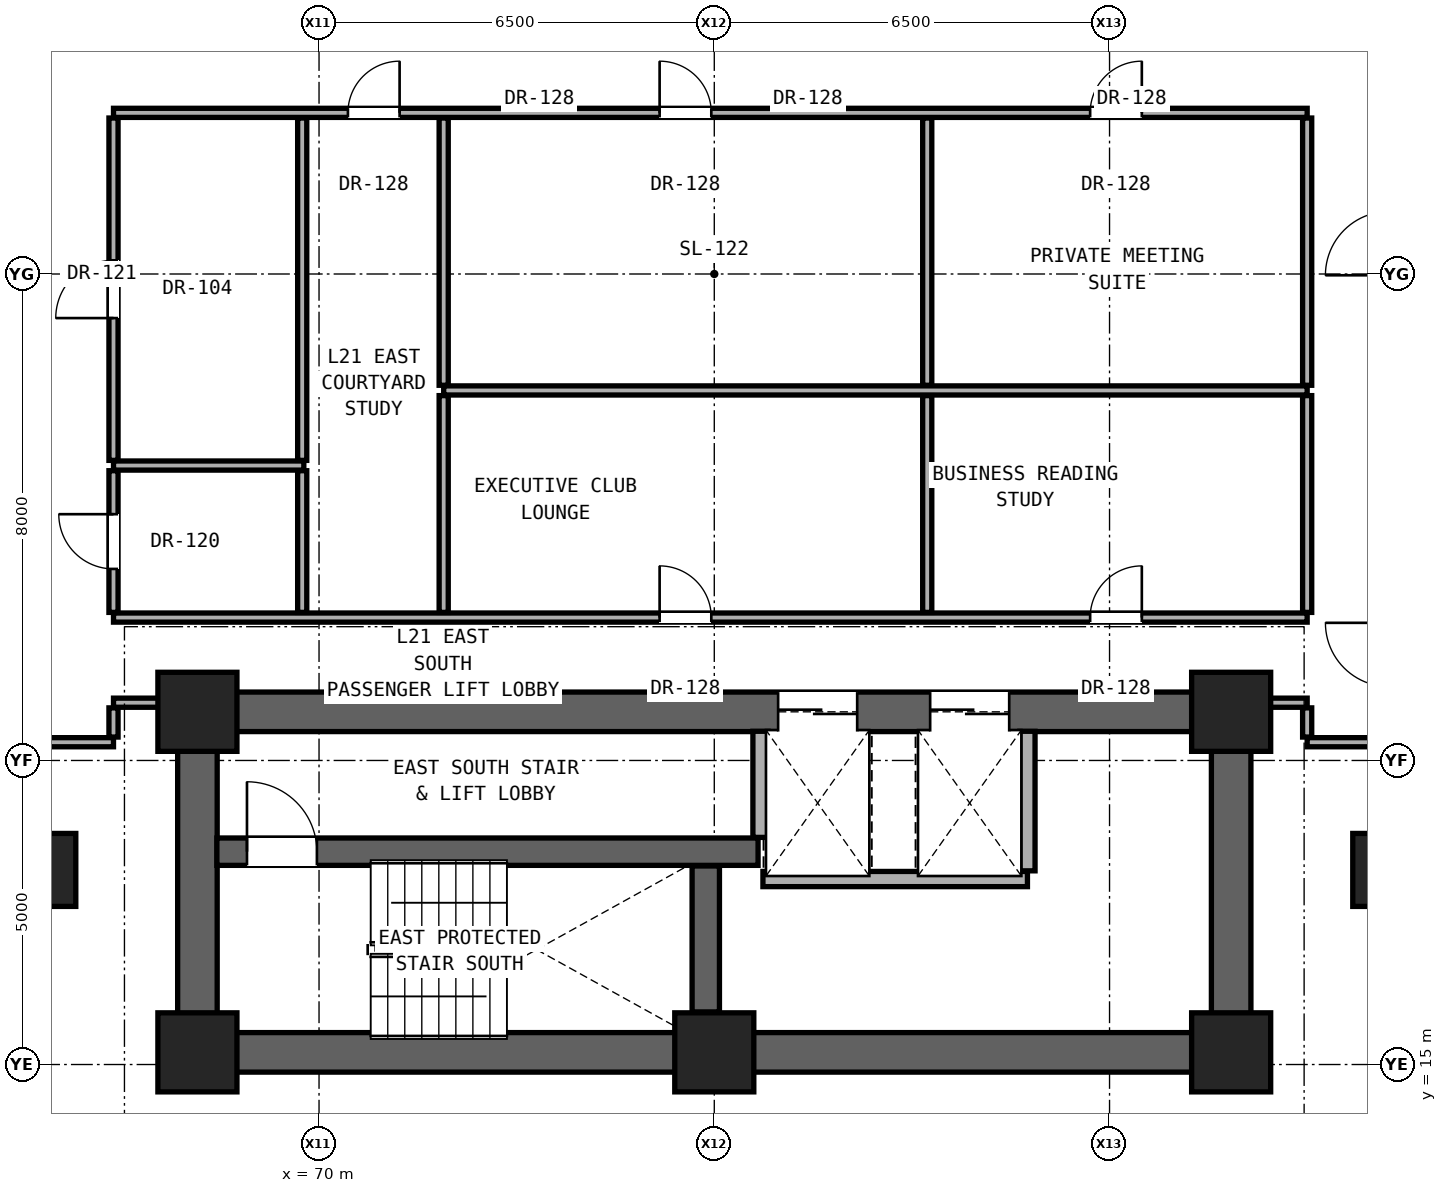
"""IFC4 building model, lengths in metres.
Left out: names, types, materials, properties, quantities, classifications, styles, units other than length and angle.
Written with IfcOpenShell. Run it as: python <this file> out.ifc"""

import sys

from ifc_helpers import new_model, si_unit, direction, frame, frame_2d, origin, origin_2d, place, context, subcontext, project, spatial, rectangle, extrude, element, fill, save


model = new_model("IFC4")
c1 = context("Model", 3, precision=1e-05, world=origin(), true_north=direction((0.0, 1.0)))
c2 = subcontext(c1, "Body", "Model", "MODEL_VIEW")
j1 = project(units=[si_unit("LENGTHUNIT", "METRE"), si_unit("PLANEANGLEUNIT", "RADIAN")], contexts=[c1])
p1 = place(None, origin())
s1 = spatial("IfcSite", under=j1, at=p1, CompositionType="ELEMENT")
p2 = place(p1, origin())
s2 = spatial("IfcBuilding", under=s1, at=p2, CompositionType="ELEMENT")
p3 = place(p2, frame((0.0, 0.0, 75.2)))
s3 = spatial("IfcBuildingStorey", under=s2, at=p3, CompositionType="ELEMENT", Elevation=75.2)
for number, where, z_axis, x_axis in (
    (1, (68.0, 15.2, 0.0), (0.0, 0.0, 1.0), (1.0, 0.0, 0.0)),
    (2, (76.5, 15.2, 0.0), (0.0, 0.0, 1.0), (1.0, 0.0, 0.0)),
    (3, (85.0, 15.2, 0.0), (0.0, 0.0, 1.0), (1.0, 0.0, 0.0)),
    (4, (68.0, 20.8, 0.0), (0.0, 0.0, 1.0), (1.0, 0.0, 0.0)),
    (5, (85.0, 20.8, 0.0), (0.0, 0.0, 1.0), (1.0, 0.0, 0.0)),
):
    element("IfcColumn", number, at=place(p3, frame(where, z_axis=z_axis, x_axis=x_axis)), inside=s3, PredefinedType="COLUMN", context=c2, shape_type="SweptSolid", body=[
        extrude(rectangle(XDim=1.3, YDim=1.3, at=origin_2d()), origin(), (0.0, 0.0, 1.0), 3.3),
    ])
for number, where, z_axis, x_axis in (
    (6, (65.6, 18.2, 0.0), (0.0, 0.0, 1.0), (1.0, 0.0, 0.0)),
    (7, (87.4, 18.2, 0.0), (0.0, 0.0, 1.0), (1.0, 0.0, 0.0)),
):
    element("IfcColumn", number, at=place(p3, frame(where, z_axis=z_axis, x_axis=x_axis)), inside=s3, PredefinedType="PILASTER", context=c2, shape_type="SweptSolid", body=[
        extrude(rectangle(XDim=0.8, YDim=1.2, at=origin_2d()), origin(), (0.0, 0.0, 1.0), 3.3),
    ])
p4 = place(p3, frame((68.0, 15.2, 0.0), z_axis=(0.0, 0.0, 1.0), x_axis=(1.0, 0.0, 0.0)))
e8 = element("IfcWall", 8, at=p4, inside=s3, PredefinedType="SHEAR", context=c2, shape_type="SweptSolid", body=[
    extrude(rectangle(XDim=17.0, YDim=0.65, at=frame_2d((8.5, 0.0))), origin(), (0.0, 0.0, 1.0), 3.06),
])
for number, where, z_axis, x_axis in (
    (9, (68.0, 15.2, 0.0), (0.0, 0.0, 1.0), (0.0, 1.0, 0.0)),
    (10, (85.0, 15.2, 0.0), (0.0, 0.0, 1.0), (0.0, 1.0, 0.0)),
):
    element("IfcWall", number, at=place(p3, frame(where, z_axis=z_axis, x_axis=x_axis)), inside=s3, PredefinedType="SHEAR", context=c2, shape_type="SweptSolid", body=[
        extrude(rectangle(XDim=5.6, YDim=0.65, at=frame_2d((2.8, 0.0))), origin(), (0.0, 0.0, 1.0), 3.06),
    ])
p5 = place(p3, frame((68.0, 20.8, 0.0), z_axis=(0.0, 0.0, 1.0), x_axis=(1.0, 0.0, 0.0)))
e11 = element("IfcWall", 11, at=p5, inside=s3, PredefinedType="SHEAR", context=c2, shape_type="SweptSolid", body=[
    extrude(rectangle(XDim=17.0, YDim=0.65, at=frame_2d((8.5, 0.0))), origin(), (0.0, 0.0, 1.0), 3.06),
])
p6 = place(p5, frame((9.55, 0.0, 0.0)))
e12 = element("IfcOpeningElement", 12, at=p6, cuts=e11, PredefinedType="OPENING", context=c2, shape_type="SweptSolid", body=[
    extrude(rectangle(XDim=1.3, YDim=2.3, at=frame_2d((0.65, 1.15))), frame((0.0, 0.335, 0.0), z_axis=(0.0, -1.0, 0.0), x_axis=(1.0, 0.0, 0.0)), (0.0, 0.0, 1.0), 0.67),
])
p7 = place(p5, frame((12.05, 0.0, 0.0)))
e13 = element("IfcOpeningElement", 13, at=p7, cuts=e11, PredefinedType="OPENING", context=c2, shape_type="SweptSolid", body=[
    extrude(rectangle(XDim=1.3, YDim=2.3, at=frame_2d((0.65, 1.15))), frame((0.0, 0.335, 0.0), z_axis=(0.0, -1.0, 0.0), x_axis=(1.0, 0.0, 0.0)), (0.0, 0.0, 1.0), 0.67),
])
p8 = place(p3, frame((77.3, 18.05, 0.0), z_axis=(0.0, 0.0, 1.0), x_axis=(1.0, 0.0, 0.0)))
e14 = element("IfcWall", 14, at=p8, inside=s3, PredefinedType="SOLIDWALL", context=c2, shape_type="SweptSolid", body=[
    extrude(rectangle(XDim=4.35, YDim=0.25, at=frame_2d((2.175, 0.0))), origin(), (0.0, 0.0, 1.0), 3.06),
])
p9 = place(p3, frame((68.32, 18.5, 0.0), z_axis=(0.0, 0.0, 1.0), x_axis=(1.0, 0.0, 0.0)))
e15 = element("IfcWall", 15, at=p9, inside=s3, PredefinedType="SHEAR", context=c2, shape_type="SweptSolid", body=[
    extrude(rectangle(XDim=8.9, YDim=0.45, at=frame_2d((4.45, 0.0))), origin(), (0.0, 0.0, 1.0), 3.06),
])
p10 = place(p9, frame((0.495, 0.0, 0.0)))
e16 = element("IfcOpeningElement", 16, at=p10, cuts=e15, PredefinedType="OPENING", context=c2, shape_type="SweptSolid", body=[
    extrude(rectangle(XDim=1.15, YDim=2.2, at=frame_2d((0.575, 1.1))), frame((0.0, 0.235, 0.0), z_axis=(0.0, -1.0, 0.0), x_axis=(1.0, 0.0, 0.0)), (0.0, 0.0, 1.0), 0.47),
])
p11 = place(p3, frame((65.25, 20.3, 0.0), z_axis=(0.0, 0.0, 1.0), x_axis=(1.0, 0.0, 0.0)))
e17 = element("IfcWall", 17, at=p11, inside=s3, PredefinedType="PARTITIONING", context=c2, shape_type="SweptSolid", body=[
    extrude(rectangle(XDim=1.37, YDim=0.15, at=frame_2d((0.685, 0.0))), origin(), (0.0, 0.0, 1.0), 3.06),
])
p12 = place(p3, frame((86.25, 20.3, 0.0), z_axis=(0.0, 0.0, 1.0), x_axis=(1.0, 0.0, 0.0)))
e18 = element("IfcWall", 18, at=p12, inside=s3, PredefinedType="PARTITIONING", context=c2, shape_type="SweptSolid", body=[
    extrude(rectangle(XDim=1.35, YDim=0.15, at=frame_2d((0.675, 0.0))), origin(), (0.0, 0.0, 1.0), 3.06),
])
p13 = place(p3, frame((66.62, 20.95, 0.0), z_axis=(0.0, 0.0, 1.0), x_axis=(1.0, 0.0, 0.0)))
e19 = element("IfcWall", 19, at=p13, inside=s3, PredefinedType="PARTITIONING", context=c2, shape_type="SweptSolid", body=[
    extrude(rectangle(XDim=1.06, YDim=0.15, at=frame_2d((0.53, 0.0))), origin(), (0.0, 0.0, 1.0), 2.452),
])
p14 = place(p3, frame((85.32, 20.95, 0.0), z_axis=(0.0, 0.0, 1.0), x_axis=(1.0, 0.0, 0.0)))
e20 = element("IfcWall", 20, at=p14, inside=s3, PredefinedType="PARTITIONING", context=c2, shape_type="SweptSolid", body=[
    extrude(rectangle(XDim=0.93, YDim=0.15, at=frame_2d((0.465, 0.0))), origin(), (0.0, 0.0, 1.0), 2.452),
])
p15 = place(p3, frame((66.62, 22.35, 0.0), z_axis=(0.0, 0.0, 1.0), x_axis=(1.0, 0.0, 0.0)))
e21 = element("IfcWall", 21, at=p15, inside=s3, PredefinedType="PARTITIONING", context=c2, shape_type="SweptSolid", body=[
    extrude(rectangle(XDim=19.63, YDim=0.15, at=frame_2d((9.815, 0.0))), origin(), (0.0, 0.0, 1.0), 2.125),
])
p16 = place(p15, frame((8.981, 0.0, 0.0)))
e22 = element("IfcOpeningElement", 22, at=p16, cuts=e21, PredefinedType="OPENING", context=c2, shape_type="SweptSolid", body=[
    extrude(rectangle(XDim=0.85, YDim=2.01, at=frame_2d((0.425, 1.005))), frame((0.0, 0.085, 0.0), z_axis=(0.0, -1.0, 0.0), x_axis=(1.0, 0.0, 0.0)), (0.0, 0.0, 1.0), 0.17),
])
p17 = place(p15, frame((16.061, 0.0, 0.0)))
e23 = element("IfcOpeningElement", 23, at=p17, cuts=e21, PredefinedType="OPENING", context=c2, shape_type="SweptSolid", body=[
    extrude(rectangle(XDim=0.85, YDim=2.01, at=frame_2d((0.425, 1.005))), frame((0.0, 0.085, 0.0), z_axis=(0.0, -1.0, 0.0), x_axis=(1.0, 0.0, 0.0)), (0.0, 0.0, 1.0), 0.17),
])
p18 = place(p3, frame((66.62, 24.85, 0.0), z_axis=(0.0, 0.0, 1.0), x_axis=(1.0, 0.0, 0.0)))
e24 = element("IfcWall", 24, at=p18, inside=s3, PredefinedType="PARTITIONING", context=c2, shape_type="SweptSolid", body=[
    extrude(rectangle(XDim=3.13, YDim=0.15, at=frame_2d((1.565, 0.0))), origin(), (0.0, 0.0, 1.0), 2.125),
])
p19 = place(p3, frame((72.05, 26.085, 0.0), z_axis=(0.0, 0.0, 1.0), x_axis=(1.0, 0.0, 0.0)))
e25 = element("IfcWall", 25, at=p19, inside=s3, PredefinedType="PARTITIONING", context=c2, shape_type="SweptSolid", body=[
    extrude(rectangle(XDim=14.2, YDim=0.15, at=frame_2d((7.1, 0.0))), origin(), (0.0, 0.0, 1.0), 2.125),
])
p20 = place(p3, frame((66.62, 30.65, 0.0), z_axis=(0.0, 0.0, 1.0), x_axis=(1.0, 0.0, 0.0)))
e26 = element("IfcWall", 26, at=p20, inside=s3, PredefinedType="PARTITIONING", context=c2, shape_type="SweptSolid", body=[
    extrude(rectangle(XDim=19.63, YDim=0.15, at=frame_2d((9.815, 0.0))), origin(), (0.0, 0.0, 1.0), 2.125),
])
p21 = place(p20, frame((3.855, 0.0, 0.0)))
e27 = element("IfcOpeningElement", 27, at=p21, cuts=e26, PredefinedType="OPENING", context=c2, shape_type="SweptSolid", body=[
    extrude(rectangle(XDim=0.85, YDim=2.01, at=frame_2d((0.425, 1.005))), frame((0.0, 0.085, 0.0), z_axis=(0.0, -1.0, 0.0), x_axis=(1.0, 0.0, 0.0)), (0.0, 0.0, 1.0), 0.17),
])
p22 = place(p20, frame((8.981, 0.0, 0.0)))
e28 = element("IfcOpeningElement", 28, at=p22, cuts=e26, PredefinedType="OPENING", context=c2, shape_type="SweptSolid", body=[
    extrude(rectangle(XDim=0.85, YDim=2.01, at=frame_2d((0.425, 1.005))), frame((0.0, 0.085, 0.0), z_axis=(0.0, -1.0, 0.0), x_axis=(1.0, 0.0, 0.0)), (0.0, 0.0, 1.0), 0.17),
])
p23 = place(p20, frame((16.061, 0.0, 0.0)))
e29 = element("IfcOpeningElement", 29, at=p23, cuts=e26, PredefinedType="OPENING", context=c2, shape_type="SweptSolid", body=[
    extrude(rectangle(XDim=0.85, YDim=2.01, at=frame_2d((0.425, 1.005))), frame((0.0, 0.085, 0.0), z_axis=(0.0, -1.0, 0.0), x_axis=(1.0, 0.0, 0.0)), (0.0, 0.0, 1.0), 0.17),
])
p24 = place(p3, frame((66.62, 20.385, 0.0), z_axis=(0.0, 0.0, 1.0), x_axis=(0.0, 1.0, 0.0)))
e30 = element("IfcWall", 30, at=p24, inside=s3, PredefinedType="PARTITIONING", context=c2, shape_type="SweptSolid", body=[
    extrude(rectangle(XDim=0.48, YDim=0.15, at=frame_2d((0.24, 0.0))), origin(), (0.0, 0.0, 1.0), 2.452),
])
p25 = place(p3, frame((66.62, 22.435, 0.0), z_axis=(0.0, 0.0, 1.0), x_axis=(0.0, 1.0, 0.0)))
e31 = element("IfcWall", 31, at=p25, inside=s3, PredefinedType="PARTITIONING", context=c2, shape_type="SweptSolid", body=[
    extrude(rectangle(XDim=2.33, YDim=0.15, at=frame_2d((1.165, 0.0))), origin(), (0.0, 0.0, 1.0), 3.06),
])
p26 = place(p25, frame((0.715, 0.0, 0.0)))
e32 = element("IfcOpeningElement", 32, at=p26, cuts=e31, PredefinedType="OPENING", context=c2, shape_type="SweptSolid", body=[
    extrude(rectangle(XDim=0.9, YDim=2.1, at=frame_2d((0.45, 1.05))), frame((0.0, 0.085, 0.0), z_axis=(0.0, -1.0, 0.0), x_axis=(1.0, 0.0, 0.0)), (0.0, 0.0, 1.0), 0.17),
])
p27 = place(p3, frame((66.62, 24.935, 0.0), z_axis=(0.0, 0.0, 1.0), x_axis=(0.0, 1.0, 0.0)))
e33 = element("IfcWall", 33, at=p27, inside=s3, PredefinedType="PARTITIONING", context=c2, shape_type="SweptSolid", body=[
    extrude(rectangle(XDim=5.63, YDim=0.15, at=frame_2d((2.815, 0.0))), origin(), (0.0, 0.0, 1.0), 2.279),
])
p28 = place(p27, frame((2.34, 0.0, 0.0)))
e34 = element("IfcOpeningElement", 34, at=p28, cuts=e33, PredefinedType="OPENING", context=c2, shape_type="SweptSolid", body=[
    extrude(rectangle(XDim=0.95, YDim=2.15, at=frame_2d((0.475, 1.075))), frame((0.0, 0.085, 0.0), z_axis=(0.0, -1.0, 0.0), x_axis=(1.0, 0.0, 0.0)), (0.0, 0.0, 1.0), 0.17),
])
p29 = place(p3, frame((69.723, 22.435, 0.0), z_axis=(0.0, 0.0, 1.0), x_axis=(0.0, 1.0, 0.0)))
e35 = element("IfcWall", 35, at=p29, inside=s3, PredefinedType="PARTITIONING", context=c2, shape_type="SweptSolid", body=[
    extrude(rectangle(XDim=2.33, YDim=0.15, at=frame_2d((1.165, 0.0))), origin(), (0.0, 0.0, 1.0), 3.06),
])
p30 = place(p3, frame((69.723, 24.935, 0.0), z_axis=(0.0, 0.0, 1.0), x_axis=(0.0, 1.0, 0.0)))
e36 = element("IfcWall", 36, at=p30, inside=s3, PredefinedType="PARTITIONING", context=c2, shape_type="SweptSolid", body=[
    extrude(rectangle(XDim=5.63, YDim=0.15, at=frame_2d((2.815, 0.0))), origin(), (0.0, 0.0, 1.0), 2.125),
])
p31 = place(p3, frame((72.05, 22.435, 0.0), z_axis=(0.0, 0.0, 1.0), x_axis=(0.0, 1.0, 0.0)))
e37 = element("IfcWall", 37, at=p31, inside=s3, PredefinedType="PARTITIONING", context=c2, shape_type="SweptSolid", body=[
    extrude(rectangle(XDim=3.565, YDim=0.15, at=frame_2d((1.782, 0.0))), origin(), (0.0, 0.0, 1.0), 2.589),
])
p32 = place(p3, frame((72.05, 26.17, 0.0), z_axis=(0.0, 0.0, 1.0), x_axis=(0.0, 1.0, 0.0)))
e38 = element("IfcWall", 38, at=p32, inside=s3, PredefinedType="PARTITIONING", context=c2, shape_type="SweptSolid", body=[
    extrude(rectangle(XDim=4.395, YDim=0.15, at=frame_2d((2.198, 0.0))), origin(), (0.0, 0.0, 1.0), 2.125),
])
p33 = place(p3, frame((76.36, 15.865, 0.0), z_axis=(0.0, 0.0, 1.0), x_axis=(0.0, 1.0, 0.0)))
e39 = element("IfcWall", 39, at=p33, inside=s3, PredefinedType="SHEAR", context=c2, shape_type="SweptSolid", body=[
    extrude(rectangle(XDim=2.4, YDim=0.45, at=frame_2d((1.2, 0.0))), origin(), (0.0, 0.0, 1.0), 3.06),
])
p34 = place(p3, frame((77.26, 18.735, 0.0), z_axis=(0.0, 0.0, 1.0), x_axis=(0.0, 1.0, 0.0)))
e40 = element("IfcWall", 40, at=p34, inside=s3, PredefinedType="SOLIDWALL", context=c2, shape_type="SweptSolid", body=[
    extrude(rectangle(XDim=1.745, YDim=0.25, at=frame_2d((0.873, 0.0))), origin(), (0.0, 0.0, 1.0), 3.06),
])
p35 = place(p3, frame((80.002, 22.435, 0.0), z_axis=(0.0, 0.0, 1.0), x_axis=(0.0, 1.0, 0.0)))
e41 = element("IfcWall", 41, at=p35, inside=s3, PredefinedType="PARTITIONING", context=c2, shape_type="SweptSolid", body=[
    extrude(rectangle(XDim=3.565, YDim=0.15, at=frame_2d((1.782, 0.0))), origin(), (0.0, 0.0, 1.0), 3.06),
])
p36 = place(p3, frame((80.002, 26.17, 0.0), z_axis=(0.0, 0.0, 1.0), x_axis=(0.0, 1.0, 0.0)))
e42 = element("IfcWall", 42, at=p36, inside=s3, PredefinedType="PARTITIONING", context=c2, shape_type="SweptSolid", body=[
    extrude(rectangle(XDim=4.395, YDim=0.15, at=frame_2d((2.198, 0.0))), origin(), (0.0, 0.0, 1.0), 2.125),
])
p37 = place(p3, frame((81.65, 18.185, 0.0), z_axis=(0.0, 0.0, 1.0), x_axis=(0.0, 1.0, 0.0)))
e43 = element("IfcWall", 43, at=p37, inside=s3, PredefinedType="SOLIDWALL", context=c2, shape_type="SweptSolid", body=[
    extrude(rectangle(XDim=2.295, YDim=0.25, at=frame_2d((1.147, 0.0))), origin(), (0.0, 0.0, 1.0), 3.06),
])
p38 = place(p3, frame((86.25, 20.385, 0.0), z_axis=(0.0, 0.0, 1.0), x_axis=(0.0, 1.0, 0.0)))
e44 = element("IfcWall", 44, at=p38, inside=s3, PredefinedType="PARTITIONING", context=c2, shape_type="SweptSolid", body=[
    extrude(rectangle(XDim=0.48, YDim=0.15, at=frame_2d((0.24, 0.0))), origin(), (0.0, 0.0, 1.0), 2.452),
])
p39 = place(p3, frame((86.25, 22.435, 0.0), z_axis=(0.0, 0.0, 1.0), x_axis=(0.0, 1.0, 0.0)))
e45 = element("IfcWall", 45, at=p39, inside=s3, PredefinedType="PARTITIONING", context=c2, shape_type="SweptSolid", body=[
    extrude(rectangle(XDim=3.565, YDim=0.15, at=frame_2d((1.782, 0.0))), origin(), (0.0, 0.0, 1.0), 3.06),
])
p40 = place(p3, frame((86.25, 26.17, 0.0), z_axis=(0.0, 0.0, 1.0), x_axis=(0.0, 1.0, 0.0)))
e46 = element("IfcWall", 46, at=p40, inside=s3, PredefinedType="PARTITIONING", context=c2, shape_type="SweptSolid", body=[
    extrude(rectangle(XDim=4.395, YDim=0.15, at=frame_2d((2.198, 0.0))), origin(), (0.0, 0.0, 1.0), 2.279),
])
p41 = place(p10, origin())
e47 = element("IfcDoor", 47, at=p41, inside=s3, OperationType="SINGLE_SWING_LEFT", PredefinedType="DOOR", context=c2, shape_type="SweptSolid", body=[
    extrude(rectangle(XDim=1.15, YDim=2.2, at=frame_2d((0.575, 1.1))), frame((0.0, 0.025, 0.0), z_axis=(0.0, -1.0, 0.0), x_axis=(1.0, 0.0, 0.0)), (0.0, 0.0, 1.0), 0.05),
])
fill(e16, e47)
p42 = place(p26, origin())
e48 = element("IfcDoor", 48, at=p42, inside=s3, OperationType="SINGLE_SWING_RIGHT", PredefinedType="DOOR", context=c2, shape_type="SweptSolid", body=[
    extrude(rectangle(XDim=0.9, YDim=2.1, at=frame_2d((0.45, 1.05))), frame((0.0, 0.025, 0.0), z_axis=(0.0, -1.0, 0.0), x_axis=(1.0, 0.0, 0.0)), (0.0, 0.0, 1.0), 0.05),
])
fill(e32, e48)
p43 = place(p28, origin())
e49 = element("IfcDoor", 49, at=p43, inside=s3, OperationType="SINGLE_SWING_LEFT", PredefinedType="DOOR", context=c2, shape_type="SweptSolid", body=[
    extrude(rectangle(XDim=0.95, YDim=2.15, at=frame_2d((0.475, 1.075))), frame((0.0, 0.025, 0.0), z_axis=(0.0, -1.0, 0.0), x_axis=(1.0, 0.0, 0.0)), (0.0, 0.0, 1.0), 0.05),
])
fill(e34, e49)
p44 = place(p21, origin())
e50 = element("IfcDoor", 50, at=p44, inside=s3, OperationType="SINGLE_SWING_RIGHT", PredefinedType="DOOR", context=c2, shape_type="SweptSolid", body=[
    extrude(rectangle(XDim=0.85, YDim=2.01, at=frame_2d((0.425, 1.005))), frame((0.0, 0.025, 0.0), z_axis=(0.0, -1.0, 0.0), x_axis=(1.0, 0.0, 0.0)), (0.0, 0.0, 1.0), 0.05),
])
fill(e27, e50)
p45 = place(p16, origin())
e51 = element("IfcDoor", 51, at=p45, inside=s3, OperationType="SINGLE_SWING_LEFT", PredefinedType="DOOR", context=c2, shape_type="SweptSolid", body=[
    extrude(rectangle(XDim=0.85, YDim=2.01, at=frame_2d((0.425, 1.005))), frame((0.0, 0.025, 0.0), z_axis=(0.0, -1.0, 0.0), x_axis=(1.0, 0.0, 0.0)), (0.0, 0.0, 1.0), 0.05),
])
fill(e22, e51)
p46 = place(p17, origin())
e52 = element("IfcDoor", 52, at=p46, inside=s3, OperationType="SINGLE_SWING_RIGHT", PredefinedType="DOOR", context=c2, shape_type="SweptSolid", body=[
    extrude(rectangle(XDim=0.85, YDim=2.01, at=frame_2d((0.425, 1.005))), frame((0.0, 0.025, 0.0), z_axis=(0.0, -1.0, 0.0), x_axis=(1.0, 0.0, 0.0)), (0.0, 0.0, 1.0), 0.05),
])
fill(e23, e52)
p47 = place(p22, origin())
e53 = element("IfcDoor", 53, at=p47, inside=s3, OperationType="SINGLE_SWING_LEFT", PredefinedType="DOOR", context=c2, shape_type="SweptSolid", body=[
    extrude(rectangle(XDim=0.85, YDim=2.01, at=frame_2d((0.425, 1.005))), frame((0.0, 0.025, 0.0), z_axis=(0.0, -1.0, 0.0), x_axis=(1.0, 0.0, 0.0)), (0.0, 0.0, 1.0), 0.05),
])
fill(e28, e53)
p48 = place(p23, origin())
e54 = element("IfcDoor", 54, at=p48, inside=s3, OperationType="SINGLE_SWING_RIGHT", PredefinedType="DOOR", context=c2, shape_type="SweptSolid", body=[
    extrude(rectangle(XDim=0.85, YDim=2.01, at=frame_2d((0.425, 1.005))), frame((0.0, 0.025, 0.0), z_axis=(0.0, -1.0, 0.0), x_axis=(1.0, 0.0, 0.0)), (0.0, 0.0, 1.0), 0.05),
])
fill(e29, e54)
p49 = place(p6, origin())
e55 = element("IfcDoor", 55, at=p49, inside=s3, OperationType="DOUBLE_DOOR_SLIDING", PredefinedType="DOOR", context=c2, shape_type="SweptSolid", body=[
    extrude(rectangle(XDim=1.3, YDim=2.3, at=frame_2d((0.65, 1.15))), frame((0.0, 0.025, 0.0), z_axis=(0.0, -1.0, 0.0), x_axis=(1.0, 0.0, 0.0)), (0.0, 0.0, 1.0), 0.05),
])
fill(e12, e55)
p50 = place(p7, origin())
e56 = element("IfcDoor", 56, at=p50, inside=s3, OperationType="DOUBLE_DOOR_SLIDING", PredefinedType="DOOR", context=c2, shape_type="SweptSolid", body=[
    extrude(rectangle(XDim=1.3, YDim=2.3, at=frame_2d((0.65, 1.15))), frame((0.0, 0.025, 0.0), z_axis=(0.0, -1.0, 0.0), x_axis=(1.0, 0.0, 0.0)), (0.0, 0.0, 1.0), 0.05),
])
fill(e13, e56)
save(model, sys.argv[1])
